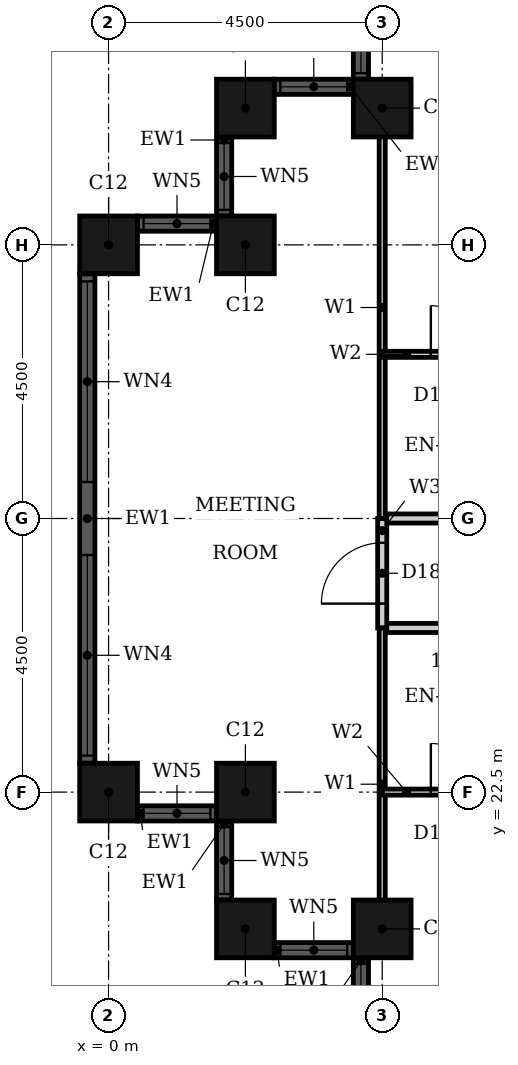
"""IFC4 building model, lengths in metres.
Left out: names, types, materials, properties, quantities, classifications, styles, units other than length and angle.
Written with IfcOpenShell. Run it as: python <this file> out.ifc"""

import sys

from ifc_helpers import new_model, si_unit, direction, frame, frame_2d, origin, origin_2d, place, context, subcontext, project, spatial, rectangle, hollow_rectangle, extrude, element, fill, save


model = new_model("IFC4")
c1 = context("Model", 3, precision=1e-05, world=origin(), true_north=direction((0.0, 1.0)))
c2 = subcontext(c1, "Body", "Model", "MODEL_VIEW")
j1 = project(units=[si_unit("LENGTHUNIT", "METRE"), si_unit("PLANEANGLEUNIT", "RADIAN")], contexts=[c1])
p1 = place(None, origin())
s1 = spatial("IfcSite", under=j1, at=p1, CompositionType="ELEMENT")
p2 = place(p1, origin())
s2 = spatial("IfcBuilding", under=s1, at=p2, CompositionType="ELEMENT")
p3 = place(p2, frame((0.0, 0.0, 78.0)))
s3 = spatial("IfcBuildingStorey", under=s2, at=p3, CompositionType="ELEMENT", Elevation=78.0)
for number, where, z_axis, x_axis in (
    (1, (4.5, 33.75, 0.0), (0.0, 0.0, 1.0), (1.0, 0.0, 0.0)),
    (2, (2.25, 33.75, 0.0), (0.0, 0.0, 1.0), (1.0, 0.0, 0.0)),
    (3, (2.25, 31.5, 0.0), (0.0, 0.0, 1.0), (1.0, 0.0, 0.0)),
    (4, (0.0, 31.5, 0.0), (0.0, 0.0, 1.0), (1.0, 0.0, 0.0)),
    (5, (0.0, 22.5, 0.0), (0.0, 0.0, 1.0), (1.0, 0.0, 0.0)),
    (6, (2.25, 22.5, 0.0), (0.0, 0.0, 1.0), (1.0, 0.0, 0.0)),
    (7, (2.25, 20.25, 0.0), (0.0, 0.0, 1.0), (1.0, 0.0, 0.0)),
    (8, (4.5, 20.25, 0.0), (0.0, 0.0, 1.0), (1.0, 0.0, 0.0)),
):
    element("IfcColumn", number, at=place(p3, frame(where, z_axis=z_axis, x_axis=x_axis)), inside=s3, PredefinedType="COLUMN", context=c2, shape_type="SweptSolid", body=[
        extrude(hollow_rectangle(XDim=0.95, YDim=0.95, WallThickness=0.03, at=origin_2d()), origin(), (0.0, 0.0, 1.0), 3.6),
    ])
p4 = place(p3, frame((4.15, 35.525, 0.0), z_axis=(0.0, 0.0, 1.0), x_axis=(0.0, -1.0, 0.0)))
e9 = element("IfcWall", 9, at=p4, inside=s3, PredefinedType="SOLIDWALL", context=c2, shape_type="SweptSolid", body=[
    extrude(rectangle(XDim=1.3, YDim=0.25, at=frame_2d((0.65, 0.0))), origin(), (0.0, 0.0, 1.0), 3.6),
])
p5 = place(p4, frame((0.1, 0.0, 0.9)))
e10 = element("IfcOpeningElement", 10, at=p5, cuts=e9, PredefinedType="OPENING", context=c2, shape_type="SweptSolid", body=[
    extrude(rectangle(XDim=1.1, YDim=2.08, at=frame_2d((0.55, 1.04))), frame((0.0, 0.135, 0.0), z_axis=(0.0, -1.0, 0.0), x_axis=(1.0, 0.0, 0.0)), (0.0, 0.0, 1.0), 0.27),
])
p6 = place(p3, frame((4.025, 34.1, 0.0), z_axis=(0.0, 0.0, 1.0), x_axis=(-1.0, 0.0, 0.0)))
e11 = element("IfcWall", 11, at=p6, inside=s3, PredefinedType="SOLIDWALL", context=c2, shape_type="SweptSolid", body=[
    extrude(rectangle(XDim=1.3, YDim=0.25, at=frame_2d((0.65, 0.0))), origin(), (0.0, 0.0, 1.0), 3.6),
])
p7 = place(p6, frame((0.1, 0.0, 0.9)))
e12 = element("IfcOpeningElement", 12, at=p7, cuts=e11, PredefinedType="OPENING", context=c2, shape_type="SweptSolid", body=[
    extrude(rectangle(XDim=1.1, YDim=2.08, at=frame_2d((0.55, 1.04))), frame((0.0, 0.135, 0.0), z_axis=(0.0, -1.0, 0.0), x_axis=(1.0, 0.0, 0.0)), (0.0, 0.0, 1.0), 0.27),
])
p8 = place(p3, frame((1.9, 33.275, 0.0), z_axis=(0.0, 0.0, 1.0), x_axis=(0.0, -1.0, 0.0)))
e13 = element("IfcWall", 13, at=p8, inside=s3, PredefinedType="SOLIDWALL", context=c2, shape_type="SweptSolid", body=[
    extrude(rectangle(XDim=1.3, YDim=0.25, at=frame_2d((0.65, 0.0))), origin(), (0.0, 0.0, 1.0), 3.6),
])
p9 = place(p8, frame((0.1, 0.0, 0.9)))
e14 = element("IfcOpeningElement", 14, at=p9, cuts=e13, PredefinedType="OPENING", context=c2, shape_type="SweptSolid", body=[
    extrude(rectangle(XDim=1.1, YDim=2.08, at=frame_2d((0.55, 1.04))), frame((0.0, 0.135, 0.0), z_axis=(0.0, -1.0, 0.0), x_axis=(1.0, 0.0, 0.0)), (0.0, 0.0, 1.0), 0.27),
])
p10 = place(p3, frame((1.775, 31.85, 0.0), z_axis=(0.0, 0.0, 1.0), x_axis=(-1.0, 0.0, 0.0)))
e15 = element("IfcWall", 15, at=p10, inside=s3, PredefinedType="SOLIDWALL", context=c2, shape_type="SweptSolid", body=[
    extrude(rectangle(XDim=1.3, YDim=0.25, at=frame_2d((0.65, 0.0))), origin(), (0.0, 0.0, 1.0), 3.6),
])
p11 = place(p10, frame((0.1, 0.0, 0.9)))
e16 = element("IfcOpeningElement", 16, at=p11, cuts=e15, PredefinedType="OPENING", context=c2, shape_type="SweptSolid", body=[
    extrude(rectangle(XDim=1.1, YDim=2.08, at=frame_2d((0.55, 1.04))), frame((0.0, 0.135, 0.0), z_axis=(0.0, -1.0, 0.0), x_axis=(1.0, 0.0, 0.0)), (0.0, 0.0, 1.0), 0.27),
])
p12 = place(p3, frame((-0.35, 31.025, 0.0), z_axis=(0.0, 0.0, 1.0), x_axis=(0.0, -1.0, 0.0)))
e17 = element("IfcWall", 17, at=p12, inside=s3, PredefinedType="SOLIDWALL", context=c2, shape_type="SweptSolid", body=[
    extrude(rectangle(XDim=8.05, YDim=0.25, at=frame_2d((4.025, 0.0))), origin(), (0.0, 0.0, 1.0), 3.6),
])
p13 = place(p12, frame((0.125, 0.0, 0.9)))
e18 = element("IfcOpeningElement", 18, at=p13, cuts=e17, PredefinedType="OPENING", context=c2, shape_type="SweptSolid", body=[
    extrude(rectangle(XDim=3.3, YDim=2.08, at=frame_2d((1.65, 1.04))), frame((0.0, 0.135, 0.0), z_axis=(0.0, -1.0, 0.0), x_axis=(1.0, 0.0, 0.0)), (0.0, 0.0, 1.0), 0.27),
])
p14 = place(p12, frame((4.625, 0.0, 0.9)))
e19 = element("IfcOpeningElement", 19, at=p14, cuts=e17, PredefinedType="OPENING", context=c2, shape_type="SweptSolid", body=[
    extrude(rectangle(XDim=3.3, YDim=2.08, at=frame_2d((1.65, 1.04))), frame((0.0, 0.135, 0.0), z_axis=(0.0, -1.0, 0.0), x_axis=(1.0, 0.0, 0.0)), (0.0, 0.0, 1.0), 0.27),
])
p15 = place(p3, frame((0.475, 22.15, 0.0), z_axis=(0.0, 0.0, 1.0), x_axis=(1.0, 0.0, 0.0)))
e20 = element("IfcWall", 20, at=p15, inside=s3, PredefinedType="SOLIDWALL", context=c2, shape_type="SweptSolid", body=[
    extrude(rectangle(XDim=1.3, YDim=0.25, at=frame_2d((0.65, 0.0))), origin(), (0.0, 0.0, 1.0), 3.6),
])
p16 = place(p15, frame((0.1, 0.0, 0.9)))
e21 = element("IfcOpeningElement", 21, at=p16, cuts=e20, PredefinedType="OPENING", context=c2, shape_type="SweptSolid", body=[
    extrude(rectangle(XDim=1.1, YDim=2.08, at=frame_2d((0.55, 1.04))), frame((0.0, 0.135, 0.0), z_axis=(0.0, -1.0, 0.0), x_axis=(1.0, 0.0, 0.0)), (0.0, 0.0, 1.0), 0.27),
])
p17 = place(p3, frame((1.9, 22.025, 0.0), z_axis=(0.0, 0.0, 1.0), x_axis=(0.0, -1.0, 0.0)))
e22 = element("IfcWall", 22, at=p17, inside=s3, PredefinedType="SOLIDWALL", context=c2, shape_type="SweptSolid", body=[
    extrude(rectangle(XDim=1.3, YDim=0.25, at=frame_2d((0.65, 0.0))), origin(), (0.0, 0.0, 1.0), 3.6),
])
p18 = place(p17, frame((0.1, 0.0, 0.9)))
e23 = element("IfcOpeningElement", 23, at=p18, cuts=e22, PredefinedType="OPENING", context=c2, shape_type="SweptSolid", body=[
    extrude(rectangle(XDim=1.1, YDim=2.08, at=frame_2d((0.55, 1.04))), frame((0.0, 0.135, 0.0), z_axis=(0.0, -1.0, 0.0), x_axis=(1.0, 0.0, 0.0)), (0.0, 0.0, 1.0), 0.27),
])
p19 = place(p3, frame((2.725, 19.9, 0.0), z_axis=(0.0, 0.0, 1.0), x_axis=(1.0, 0.0, 0.0)))
e24 = element("IfcWall", 24, at=p19, inside=s3, PredefinedType="SOLIDWALL", context=c2, shape_type="SweptSolid", body=[
    extrude(rectangle(XDim=1.3, YDim=0.25, at=frame_2d((0.65, 0.0))), origin(), (0.0, 0.0, 1.0), 3.6),
])
p20 = place(p19, frame((0.1, 0.0, 0.9)))
e25 = element("IfcOpeningElement", 25, at=p20, cuts=e24, PredefinedType="OPENING", context=c2, shape_type="SweptSolid", body=[
    extrude(rectangle(XDim=1.1, YDim=2.08, at=frame_2d((0.55, 1.04))), frame((0.0, 0.135, 0.0), z_axis=(0.0, -1.0, 0.0), x_axis=(1.0, 0.0, 0.0)), (0.0, 0.0, 1.0), 0.27),
])
p21 = place(p3, frame((4.15, 19.775, 0.0), z_axis=(0.0, 0.0, 1.0), x_axis=(0.0, -1.0, 0.0)))
e26 = element("IfcWall", 26, at=p21, inside=s3, PredefinedType="SOLIDWALL", context=c2, shape_type="SweptSolid", body=[
    extrude(rectangle(XDim=1.3, YDim=0.25, at=frame_2d((0.65, 0.0))), origin(), (0.0, 0.0, 1.0), 3.6),
])
p22 = place(p21, frame((0.1, 0.0, 0.9)))
e27 = element("IfcOpeningElement", 27, at=p22, cuts=e26, PredefinedType="OPENING", context=c2, shape_type="SweptSolid", body=[
    extrude(rectangle(XDim=1.1, YDim=2.08, at=frame_2d((0.55, 1.04))), frame((0.0, 0.135, 0.0), z_axis=(0.0, -1.0, 0.0), x_axis=(1.0, 0.0, 0.0)), (0.0, 0.0, 1.0), 0.27),
])
p23 = place(p3, frame((4.5, 25.2, 0.0), z_axis=(0.0, 0.0, 1.0), x_axis=(1.0, 0.0, 0.0)))
e28 = element("IfcWall", 28, at=p23, inside=s3, PredefinedType="PARTITIONING", context=c2, shape_type="SweptSolid", body=[
    extrude(rectangle(XDim=11.7, YDim=0.15, at=frame_2d((5.85, 0.0))), origin(), (0.0, 0.0, 1.0), 3.3),
])
p24 = place(p23, frame((7.45, 0.0, 0.0)))
e29 = element("IfcOpeningElement", 29, at=p24, cuts=e28, PredefinedType="OPENING", context=c2, shape_type="SweptSolid", body=[
    extrude(rectangle(XDim=1.0, YDim=2.1, at=frame_2d((0.5, 1.05))), frame((0.0, 0.085, 0.0), z_axis=(0.0, -1.0, 0.0), x_axis=(1.0, 0.0, 0.0)), (0.0, 0.0, 1.0), 0.17),
])
p25 = place(p23, frame((2.95, 0.0, 0.0)))
e30 = element("IfcOpeningElement", 30, at=p25, cuts=e28, PredefinedType="OPENING", context=c2, shape_type="SweptSolid", body=[
    extrude(rectangle(XDim=1.0, YDim=2.1, at=frame_2d((0.5, 1.05))), frame((0.0, 0.085, 0.0), z_axis=(0.0, -1.0, 0.0), x_axis=(1.0, 0.0, 0.0)), (0.0, 0.0, 1.0), 0.17),
])
p26 = place(p3, frame((4.5, 27.0, 0.0), z_axis=(0.0, 0.0, 1.0), x_axis=(1.0, 0.0, 0.0)))
e31 = element("IfcWall", 31, at=p26, inside=s3, PredefinedType="PARTITIONING", context=c2, shape_type="SweptSolid", body=[
    extrude(rectangle(XDim=11.7, YDim=0.15, at=frame_2d((5.85, 0.0))), origin(), (0.0, 0.0, 1.0), 2.58),
])
p27 = place(p26, frame((6.25, 0.0, 0.0)))
e32 = element("IfcOpeningElement", 32, at=p27, cuts=e31, PredefinedType="OPENING", context=c2, shape_type="SweptSolid", body=[
    extrude(rectangle(XDim=1.0, YDim=2.1, at=frame_2d((0.5, 1.05))), frame((0.0, 0.085, 0.0), z_axis=(0.0, -1.0, 0.0), x_axis=(1.0, 0.0, 0.0)), (0.0, 0.0, 1.0), 0.17),
])
p28 = place(p3, frame((4.5, 25.2, 0.0), z_axis=(0.0, 0.0, 1.0), x_axis=(0.0, 1.0, 0.0)))
e33 = element("IfcWall", 33, at=p28, inside=s3, PredefinedType="PARTITIONING", context=c2, shape_type="SweptSolid", body=[
    extrude(rectangle(XDim=1.8, YDim=0.15, at=frame_2d((0.9, 0.0))), origin(), (0.0, 0.0, 1.0), 3.3),
])
p29 = place(p28, frame((0.4, 0.0, 0.0)))
e34 = element("IfcOpeningElement", 34, at=p29, cuts=e33, PredefinedType="OPENING", context=c2, shape_type="SweptSolid", body=[
    extrude(rectangle(XDim=1.0, YDim=2.1, at=frame_2d((0.5, 1.05))), frame((0.0, 0.085, 0.0), z_axis=(0.0, -1.0, 0.0), x_axis=(1.0, 0.0, 0.0)), (0.0, 0.0, 1.0), 0.17),
])
p30 = place(p3, frame((4.5, 20.06, 0.0), z_axis=(0.0, 0.0, 1.0), x_axis=(0.0, 1.0, 0.0)))
e35 = element("IfcWall", 35, at=p30, inside=s3, PredefinedType="PARTITIONING", context=c2, shape_type="SweptSolid", body=[
    extrude(rectangle(XDim=5.14, YDim=0.1, at=frame_2d((2.57, 0.0))), origin(), (0.0, 0.0, 1.0), 3.3),
])
p31 = place(p3, frame((4.5, 27.0, 0.0), z_axis=(0.0, 0.0, 1.0), x_axis=(0.0, 1.0, 0.0)))
e36 = element("IfcWall", 36, at=p31, inside=s3, PredefinedType="PARTITIONING", context=c2, shape_type="SweptSolid", body=[
    extrude(rectangle(XDim=6.94, YDim=0.1, at=frame_2d((3.47, 0.0))), origin(), (0.0, 0.0, 1.0), 3.3),
])
p32 = place(p3, frame((4.5, 22.5, 0.0), z_axis=(0.0, 0.0, 1.0), x_axis=(1.0, 0.0, 0.0)))
e37 = element("IfcWall", 37, at=p32, inside=s3, PredefinedType="PARTITIONING", context=c2, shape_type="SweptSolid", body=[
    extrude(rectangle(XDim=2.4, YDim=0.1, at=frame_2d((1.2, 0.0))), origin(), (0.0, 0.0, 1.0), 2.58),
])
p33 = place(p32, frame((0.8, 0.0, 0.0)))
e38 = element("IfcOpeningElement", 38, at=p33, cuts=e37, PredefinedType="OPENING", context=c2, shape_type="SweptSolid", body=[
    extrude(rectangle(XDim=0.8, YDim=2.1, at=frame_2d((0.4, 1.05))), frame((0.0, 0.06, 0.0), z_axis=(0.0, -1.0, 0.0), x_axis=(1.0, 0.0, 0.0)), (0.0, 0.0, 1.0), 0.12),
])
p34 = place(p3, frame((4.5, 29.7, 0.0), z_axis=(0.0, 0.0, 1.0), x_axis=(1.0, 0.0, 0.0)))
e39 = element("IfcWall", 39, at=p34, inside=s3, PredefinedType="PARTITIONING", context=c2, shape_type="SweptSolid", body=[
    extrude(rectangle(XDim=2.4, YDim=0.1, at=frame_2d((1.2, 0.0))), origin(), (0.0, 0.0, 1.0), 3.3),
])
p35 = place(p34, frame((0.8, 0.0, 0.0)))
e40 = element("IfcOpeningElement", 40, at=p35, cuts=e39, PredefinedType="OPENING", context=c2, shape_type="SweptSolid", body=[
    extrude(rectangle(XDim=0.8, YDim=2.1, at=frame_2d((0.4, 1.05))), frame((0.0, 0.06, 0.0), z_axis=(0.0, -1.0, 0.0), x_axis=(1.0, 0.0, 0.0)), (0.0, 0.0, 1.0), 0.12),
])
p36 = place(p5, origin())
e41 = element("IfcWindow", 41, at=p36, inside=s3, PartitioningType="SINGLE_PANEL", PredefinedType="WINDOW", context=c2, shape_type="SweptSolid", body=[
    extrude(rectangle(XDim=1.1, YDim=2.08, at=frame_2d((0.55, 1.04))), frame((0.0, 0.03, 0.0), z_axis=(0.0, -1.0, 0.0), x_axis=(1.0, 0.0, 0.0)), (0.0, 0.0, 1.0), 0.06),
])
fill(e10, e41)
p37 = place(p7, origin())
e42 = element("IfcWindow", 42, at=p37, inside=s3, PartitioningType="SINGLE_PANEL", PredefinedType="WINDOW", context=c2, shape_type="SweptSolid", body=[
    extrude(rectangle(XDim=1.1, YDim=2.08, at=frame_2d((0.55, 1.04))), frame((0.0, 0.03, 0.0), z_axis=(0.0, -1.0, 0.0), x_axis=(1.0, 0.0, 0.0)), (0.0, 0.0, 1.0), 0.06),
])
fill(e12, e42)
p38 = place(p9, origin())
e43 = element("IfcWindow", 43, at=p38, inside=s3, PartitioningType="SINGLE_PANEL", PredefinedType="WINDOW", context=c2, shape_type="SweptSolid", body=[
    extrude(rectangle(XDim=1.1, YDim=2.08, at=frame_2d((0.55, 1.04))), frame((0.0, 0.03, 0.0), z_axis=(0.0, -1.0, 0.0), x_axis=(1.0, 0.0, 0.0)), (0.0, 0.0, 1.0), 0.06),
])
fill(e14, e43)
p39 = place(p11, origin())
e44 = element("IfcWindow", 44, at=p39, inside=s3, PartitioningType="SINGLE_PANEL", PredefinedType="WINDOW", context=c2, shape_type="SweptSolid", body=[
    extrude(rectangle(XDim=1.1, YDim=2.08, at=frame_2d((0.55, 1.04))), frame((0.0, 0.03, 0.0), z_axis=(0.0, -1.0, 0.0), x_axis=(1.0, 0.0, 0.0)), (0.0, 0.0, 1.0), 0.06),
])
fill(e16, e44)
p40 = place(p13, origin())
e45 = element("IfcWindow", 45, at=p40, inside=s3, PartitioningType="SINGLE_PANEL", PredefinedType="WINDOW", context=c2, shape_type="SweptSolid", body=[
    extrude(rectangle(XDim=3.3, YDim=2.08, at=frame_2d((1.65, 1.04))), frame((0.0, 0.03, 0.0), z_axis=(0.0, -1.0, 0.0), x_axis=(1.0, 0.0, 0.0)), (0.0, 0.0, 1.0), 0.06),
])
fill(e18, e45)
p41 = place(p14, origin())
e46 = element("IfcWindow", 46, at=p41, inside=s3, PartitioningType="SINGLE_PANEL", PredefinedType="WINDOW", context=c2, shape_type="SweptSolid", body=[
    extrude(rectangle(XDim=3.3, YDim=2.08, at=frame_2d((1.65, 1.04))), frame((0.0, 0.03, 0.0), z_axis=(0.0, -1.0, 0.0), x_axis=(1.0, 0.0, 0.0)), (0.0, 0.0, 1.0), 0.06),
])
fill(e19, e46)
p42 = place(p16, origin())
e47 = element("IfcWindow", 47, at=p42, inside=s3, PartitioningType="SINGLE_PANEL", PredefinedType="WINDOW", context=c2, shape_type="SweptSolid", body=[
    extrude(rectangle(XDim=1.1, YDim=2.08, at=frame_2d((0.55, 1.04))), frame((0.0, 0.03, 0.0), z_axis=(0.0, -1.0, 0.0), x_axis=(1.0, 0.0, 0.0)), (0.0, 0.0, 1.0), 0.06),
])
fill(e21, e47)
p43 = place(p18, origin())
e48 = element("IfcWindow", 48, at=p43, inside=s3, PartitioningType="SINGLE_PANEL", PredefinedType="WINDOW", context=c2, shape_type="SweptSolid", body=[
    extrude(rectangle(XDim=1.1, YDim=2.08, at=frame_2d((0.55, 1.04))), frame((0.0, 0.03, 0.0), z_axis=(0.0, -1.0, 0.0), x_axis=(1.0, 0.0, 0.0)), (0.0, 0.0, 1.0), 0.06),
])
fill(e23, e48)
p44 = place(p20, origin())
e49 = element("IfcWindow", 49, at=p44, inside=s3, PartitioningType="SINGLE_PANEL", PredefinedType="WINDOW", context=c2, shape_type="SweptSolid", body=[
    extrude(rectangle(XDim=1.1, YDim=2.08, at=frame_2d((0.55, 1.04))), frame((0.0, 0.03, 0.0), z_axis=(0.0, -1.0, 0.0), x_axis=(1.0, 0.0, 0.0)), (0.0, 0.0, 1.0), 0.06),
])
fill(e25, e49)
p45 = place(p22, origin())
e50 = element("IfcWindow", 50, at=p45, inside=s3, PartitioningType="SINGLE_PANEL", PredefinedType="WINDOW", context=c2, shape_type="SweptSolid", body=[
    extrude(rectangle(XDim=1.1, YDim=2.08, at=frame_2d((0.55, 1.04))), frame((0.0, 0.03, 0.0), z_axis=(0.0, -1.0, 0.0), x_axis=(1.0, 0.0, 0.0)), (0.0, 0.0, 1.0), 0.06),
])
fill(e27, e50)
p46 = place(p33, origin())
e51 = element("IfcDoor", 51, at=p46, inside=s3, OperationType="SINGLE_SWING_RIGHT", PredefinedType="DOOR", context=c2, shape_type="SweptSolid", body=[
    extrude(rectangle(XDim=0.8, YDim=2.1, at=frame_2d((0.4, 1.05))), frame((0.0, 0.025, 0.0), z_axis=(0.0, -1.0, 0.0), x_axis=(1.0, 0.0, 0.0)), (0.0, 0.0, 1.0), 0.05),
])
fill(e38, e51)
p47 = place(p35, origin())
e52 = element("IfcDoor", 52, at=p47, inside=s3, OperationType="SINGLE_SWING_LEFT", PredefinedType="DOOR", context=c2, shape_type="SweptSolid", body=[
    extrude(rectangle(XDim=0.8, YDim=2.1, at=frame_2d((0.4, 1.05))), frame((0.0, 0.025, 0.0), z_axis=(0.0, -1.0, 0.0), x_axis=(1.0, 0.0, 0.0)), (0.0, 0.0, 1.0), 0.05),
])
fill(e40, e52)
p48 = place(p29, origin())
e53 = element("IfcDoor", 53, at=p48, inside=s3, OperationType="SINGLE_SWING_LEFT", PredefinedType="DOOR", context=c2, shape_type="SweptSolid", body=[
    extrude(rectangle(XDim=1.0, YDim=2.1, at=frame_2d((0.5, 1.05))), frame((0.0, 0.025, 0.0), z_axis=(0.0, -1.0, 0.0), x_axis=(1.0, 0.0, 0.0)), (0.0, 0.0, 1.0), 0.05),
])
fill(e34, e53)
save(model, sys.argv[1])
